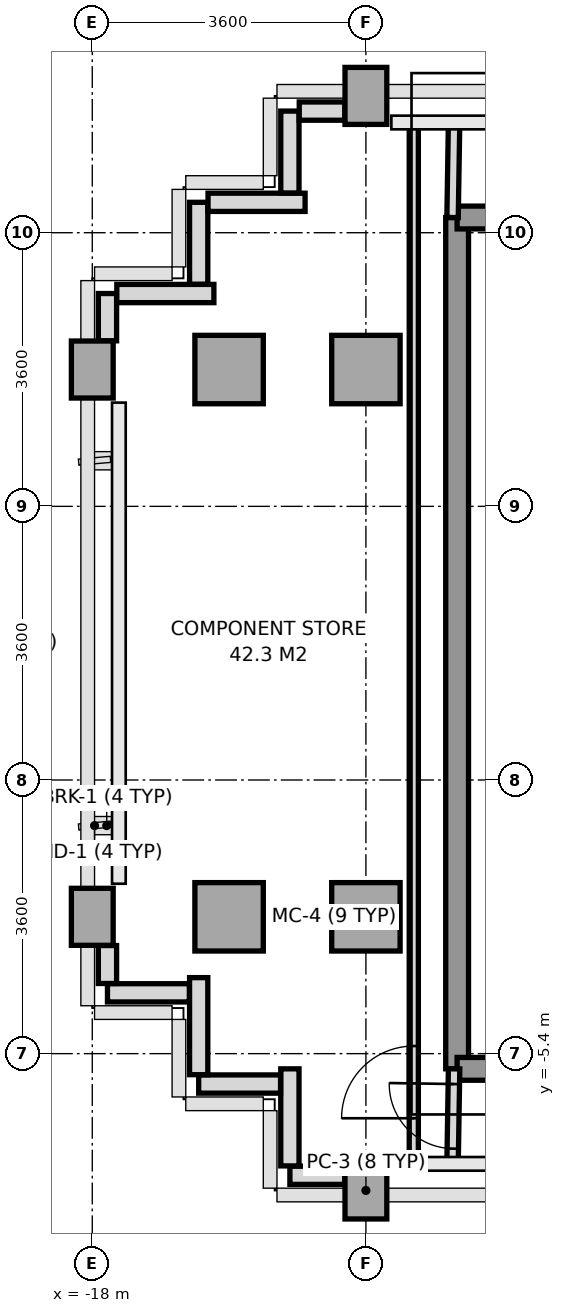
"""IFC4 building model, lengths in metres.
Left out: names, types, materials, properties, quantities, classifications, styles, units other than length and angle.
Written with IfcOpenShell. Run it as: python <this file> out.ifc"""

import sys

from ifc_helpers import new_model, si_unit, direction, frame, frame_2d, origin, origin_2d, place, context, subcontext, project, spatial, rectangle, extrude, source, transform, mapped, element, fill, save


model = new_model("IFC4")
c1 = context("Model", 3, precision=1e-05, world=origin(), true_north=direction((0.0, 1.0)))
c2 = subcontext(c1, "Body", "Model", "MODEL_VIEW")
j1 = project(units=[si_unit("LENGTHUNIT", "METRE"), si_unit("PLANEANGLEUNIT", "RADIAN")], contexts=[c1])
p1 = place(None, origin())
s1 = spatial("IfcSite", under=j1, at=p1, CompositionType="ELEMENT")
p2 = place(p1, origin())
s2 = spatial("IfcBuilding", under=s1, at=p2, CompositionType="ELEMENT")
p3 = place(p2, frame((0.0, 0.0, 239.6)))
s3 = spatial("IfcBuildingStorey", under=s2, at=p3, CompositionType="ELEMENT", Elevation=239.6)
m1 = source(origin(), c2, "Body", "SweptSolid", [
    extrude(rectangle(XDim=0.55, YDim=0.75, at=origin_2d()), origin(), (0.0, 0.0, 1.0), 3.01),
])
for number, where, z_axis, x_axis in (
    (1, (-18.0, -3.6, 0.0), (0.0, 0.0, 1.0), (1.0, 0.0, 0.0)),
    (2, (-18.0, 3.6, 0.0), (0.0, 0.0, 1.0), (1.0, 0.0, 0.0)),
):
    element("IfcColumn", number, at=place(p3, frame(where, z_axis=z_axis, x_axis=x_axis)), inside=s3, PredefinedType="COLUMN", context=c2, shape_type="MappedRepresentation", body=[
        mapped(m1, transform((0.0, 0.0, 0.0), x_axis=(1.0, 0.0, 0.0), y_axis=(0.0, 1.0, 0.0), z_axis=(0.0, 0.0, 1.0), scale=1.0)),
    ])
m2 = source(origin(), c2, "Body", "SweptSolid", [
    extrude(rectangle(XDim=0.9, YDim=0.9, at=origin_2d()), origin(), (0.0, 0.0, 1.0), 3.01),
])
for number, where, z_axis, x_axis in (
    (3, (-16.2, -3.6, 0.0), (0.0, 0.0, 1.0), (1.0, 0.0, 0.0)),
    (4, (-16.2, 3.6, 0.0), (0.0, 0.0, 1.0), (1.0, 0.0, 0.0)),
):
    element("IfcColumn", number, at=place(p3, frame(where, z_axis=z_axis, x_axis=x_axis)), inside=s3, PredefinedType="COLUMN", context=c2, shape_type="MappedRepresentation", body=[
        mapped(m2, transform((0.0, 0.0, 0.0), x_axis=(1.0, 0.0, 0.0), y_axis=(0.0, 1.0, 0.0), z_axis=(0.0, 0.0, 1.0), scale=1.0)),
    ])
p4 = place(p3, frame((-14.4, -7.2, 0.0), z_axis=(0.0, 0.0, 1.0), x_axis=(1.0, 0.0, 0.0)))
e5 = element("IfcColumn", 5, at=p4, inside=s3, PredefinedType="COLUMN", context=c2, shape_type="MappedRepresentation", body=[
    mapped(m1, transform((0.0, 0.0, 0.0), x_axis=(1.0, 0.0, 0.0), y_axis=(0.0, 1.0, 0.0), z_axis=(0.0, 0.0, 1.0), scale=1.0)),
])
for number, where, z_axis, x_axis in (
    (6, (-14.4, -3.6, 0.0), (0.0, 0.0, 1.0), (1.0, 0.0, 0.0)),
    (7, (-14.4, 3.6, 0.0), (0.0, 0.0, 1.0), (1.0, 0.0, 0.0)),
):
    element("IfcColumn", number, at=place(p3, frame(where, z_axis=z_axis, x_axis=x_axis)), inside=s3, PredefinedType="COLUMN", context=c2, shape_type="MappedRepresentation", body=[
        mapped(m2, transform((0.0, 0.0, 0.0), x_axis=(1.0, 0.0, 0.0), y_axis=(0.0, 1.0, 0.0), z_axis=(0.0, 0.0, 1.0), scale=1.0)),
    ])
p5 = place(p3, frame((-14.4, 7.2, 0.0), z_axis=(0.0, 0.0, 1.0), x_axis=(1.0, 0.0, 0.0)))
e8 = element("IfcColumn", 8, at=p5, inside=s3, PredefinedType="COLUMN", context=c2, shape_type="MappedRepresentation", body=[
    mapped(m1, transform((0.0, 0.0, 0.0), x_axis=(1.0, 0.0, 0.0), y_axis=(0.0, 1.0, 0.0), z_axis=(0.0, 0.0, 1.0), scale=1.0)),
])
p6 = place(p3, frame((-14.678, -7.0, 0.0), z_axis=(0.0, 0.0, 1.0), x_axis=(-1.0, 0.0, 0.0)))
e9 = element("IfcWall", 9, at=p6, inside=s3, PredefinedType="PARAPET", context=c2, shape_type="SweptSolid", body=[
    extrude(rectangle(XDim=0.722, YDim=0.24, at=frame_2d((0.361, 0.0))), origin(), (0.0, 0.0, 1.0), 1.15),
])
p7 = place(p3, frame((-15.4, -6.877, 0.0), z_axis=(0.0, 0.0, 1.0), x_axis=(0.0, 1.0, 0.0)))
e10 = element("IfcWall", 10, at=p7, inside=s3, PredefinedType="PARAPET", context=c2, shape_type="SweptSolid", body=[
    extrude(rectangle(XDim=1.277, YDim=0.24, at=frame_2d((0.638, 0.0))), origin(), (0.0, 0.0, 1.0), 1.15),
])
p8 = place(p3, frame((-15.523, -5.8, 0.0), z_axis=(0.0, 0.0, 1.0), x_axis=(-1.0, 0.0, 0.0)))
e11 = element("IfcWall", 11, at=p8, inside=s3, PredefinedType="PARAPET", context=c2, shape_type="SweptSolid", body=[
    extrude(rectangle(XDim=1.077, YDim=0.24, at=frame_2d((0.539, 0.0))), origin(), (0.0, 0.0, 1.0), 1.15),
])
p9 = place(p3, frame((-16.6, -5.677, 0.0), z_axis=(0.0, 0.0, 1.0), x_axis=(0.0, 1.0, 0.0)))
e12 = element("IfcWall", 12, at=p9, inside=s3, PredefinedType="PARAPET", context=c2, shape_type="SweptSolid", body=[
    extrude(rectangle(XDim=1.277, YDim=0.24, at=frame_2d((0.639, 0.0))), origin(), (0.0, 0.0, 1.0), 1.15),
])
p10 = place(p3, frame((-16.723, -4.6, 0.0), z_axis=(0.0, 0.0, 1.0), x_axis=(-1.0, 0.0, 0.0)))
e13 = element("IfcWall", 13, at=p10, inside=s3, PredefinedType="PARAPET", context=c2, shape_type="SweptSolid", body=[
    extrude(rectangle(XDim=1.077, YDim=0.24, at=frame_2d((0.539, 0.0))), origin(), (0.0, 0.0, 1.0), 1.15),
])
p11 = place(p3, frame((-17.8, -4.477, 0.0), z_axis=(0.0, 0.0, 1.0), x_axis=(0.0, 1.0, 0.0)))
e14 = element("IfcWall", 14, at=p11, inside=s3, PredefinedType="PARAPET", context=c2, shape_type="SweptSolid", body=[
    extrude(rectangle(XDim=0.499, YDim=0.24, at=frame_2d((0.25, 0.0))), origin(), (0.0, 0.0, 1.0), 1.15),
])
p12 = place(p3, frame((-17.8, 3.978, 0.0), z_axis=(0.0, 0.0, 1.0), x_axis=(0.0, 1.0, 0.0)))
e15 = element("IfcWall", 15, at=p12, inside=s3, PredefinedType="PARAPET", context=c2, shape_type="SweptSolid", body=[
    extrude(rectangle(XDim=0.622, YDim=0.24, at=frame_2d((0.311, 0.0))), origin(), (0.0, 0.0, 1.0), 1.15),
])
p13 = place(p3, frame((-17.677, 4.6, 0.0), z_axis=(0.0, 0.0, 1.0), x_axis=(1.0, 0.0, 0.0)))
e16 = element("IfcWall", 16, at=p13, inside=s3, PredefinedType="PARAPET", context=c2, shape_type="SweptSolid", body=[
    extrude(rectangle(XDim=1.277, YDim=0.24, at=frame_2d((0.639, 0.0))), origin(), (0.0, 0.0, 1.0), 1.15),
])
p14 = place(p3, frame((-16.6, 4.723, 0.0), z_axis=(0.0, 0.0, 1.0), x_axis=(0.0, 1.0, 0.0)))
e17 = element("IfcWall", 17, at=p14, inside=s3, PredefinedType="PARAPET", context=c2, shape_type="SweptSolid", body=[
    extrude(rectangle(XDim=1.077, YDim=0.24, at=frame_2d((0.539, 0.0))), origin(), (0.0, 0.0, 1.0), 1.15),
])
p15 = place(p3, frame((-16.477, 5.8, 0.0), z_axis=(0.0, 0.0, 1.0), x_axis=(1.0, 0.0, 0.0)))
e18 = element("IfcWall", 18, at=p15, inside=s3, PredefinedType="PARAPET", context=c2, shape_type="SweptSolid", body=[
    extrude(rectangle(XDim=1.277, YDim=0.24, at=frame_2d((0.639, 0.0))), origin(), (0.0, 0.0, 1.0), 1.15),
])
p16 = place(p3, frame((-15.4, 5.923, 0.0), z_axis=(0.0, 0.0, 1.0), x_axis=(0.0, 1.0, 0.0)))
e19 = element("IfcWall", 19, at=p16, inside=s3, PredefinedType="PARAPET", context=c2, shape_type="SweptSolid", body=[
    extrude(rectangle(XDim=1.077, YDim=0.24, at=frame_2d((0.539, 0.0))), origin(), (0.0, 0.0, 1.0), 1.15),
])
p17 = place(p3, frame((-15.277, 7.0, 0.0), z_axis=(0.0, 0.0, 1.0), x_axis=(1.0, 0.0, 0.0)))
e20 = element("IfcWall", 20, at=p17, inside=s3, PredefinedType="PARAPET", context=c2, shape_type="SweptSolid", body=[
    extrude(rectangle(XDim=0.599, YDim=0.24, at=frame_2d((0.3, 0.0))), origin(), (0.0, 0.0, 1.0), 1.15),
])
p18 = place(p3, frame((-13.2, -5.6, 0.0), z_axis=(0.0, 0.0, 1.0), x_axis=(0.0, 1.0, 0.0)))
e21 = element("IfcWall", 21, at=p18, inside=s3, PredefinedType="SHEAR", context=c2, shape_type="SweptSolid", body=[
    extrude(rectangle(XDim=11.2, YDim=0.3, at=frame_2d((5.6, 0.0))), origin(), (0.0, 0.0, 1.0), 3.01),
])
p19 = place(p3, frame((-13.2, 5.6, 0.0), z_axis=(0.0, 0.0, 1.0), x_axis=(1.0, 0.0, 0.0)))
e22 = element("IfcWall", 22, at=p19, inside=s3, PredefinedType="SHEAR", context=c2, shape_type="SweptSolid", body=[
    extrude(rectangle(XDim=1.844, YDim=0.3, at=frame_2d((0.922, 0.0))), origin(), (0.0, 0.0, 1.0), 3.01),
])
p20 = place(p3, frame((-13.2, -5.6, 0.0), z_axis=(0.0, 0.0, 1.0), x_axis=(1.0, 0.0, 0.0)))
e23 = element("IfcWall", 23, at=p20, inside=s3, PredefinedType="SHEAR", context=c2, shape_type="SweptSolid", body=[
    extrude(rectangle(XDim=7.8, YDim=0.3, at=frame_2d((3.9, 0.0))), origin(), (0.0, 0.0, 1.0), 3.01),
])
p21 = place(p3, frame((-13.26, 5.6, 0.0), z_axis=(0.0, 0.0, 1.0), x_axis=(0.016013571389, 0.999871774545, 0.0)))
e24 = element("IfcWall", 24, at=p21, inside=s3, PredefinedType="PARTITIONING", context=c2, shape_type="SweptSolid", body=[
    extrude(rectangle(XDim=1.25, YDim=0.15, at=frame_2d((0.625, 0.0))), origin(), (0.0, 0.0, 1.0), 3.01),
])
p22 = place(p3, frame((-13.26, -6.85, 0.0), z_axis=(0.0, 0.0, 1.0), x_axis=(0.016013571389, 0.999871774545, 0.0)))
e25 = element("IfcWall", 25, at=p22, inside=s3, PredefinedType="PARTITIONING", context=c2, shape_type="SweptSolid", body=[
    extrude(rectangle(XDim=1.25, YDim=0.15, at=frame_2d((0.625, 0.0))), origin(), (0.0, 0.0, 1.0), 3.01),
])
p23 = place(p22, frame((0.2, 0.0, 0.0)))
e26 = element("IfcOpeningElement", 26, at=p23, cuts=e25, PredefinedType="OPENING", context=c2, shape_type="SweptSolid", body=[
    extrude(rectangle(XDim=0.85, YDim=2.1, at=frame_2d((0.425, 1.05))), frame((0.0, 0.085, 0.0), z_axis=(0.0, -1.0, 0.0), x_axis=(1.0, 0.0, 0.0)), (0.0, 0.0, 1.0), 0.17),
])
p24 = place(p3, frame((-13.77, -6.85, 0.0), z_axis=(0.0, 0.0, 1.0), x_axis=(0.0, 1.0, 0.0)))
e27 = element("IfcWall", 27, at=p24, inside=s3, PredefinedType="PARTITIONING", context=c2, shape_type="SweptSolid", body=[
    extrude(rectangle(XDim=13.7, YDim=0.12, at=frame_2d((6.85, 0.0))), origin(), (0.0, 0.0, 1.0), 2.71),
])
p25 = place(p24, frame((0.6, 0.0, 0.0)))
e28 = element("IfcOpeningElement", 28, at=p25, cuts=e27, PredefinedType="OPENING", context=c2, shape_type="SweptSolid", body=[
    extrude(rectangle(XDim=0.95, YDim=2.15, at=frame_2d((0.475, 1.075))), frame((0.0, 0.07, 0.0), z_axis=(0.0, -1.0, 0.0), x_axis=(1.0, 0.0, 0.0)), (0.0, 0.0, 1.0), 0.14),
])
m3 = source(origin(), c2, "Body", "SweptSolid", [
    extrude(rectangle(XDim=0.95, YDim=2.15, at=frame_2d((0.475, 1.075))), frame((0.0, 0.025, 0.0), z_axis=(0.0, -1.0, 0.0), x_axis=(1.0, 0.0, 0.0)), (0.0, 0.0, 1.0), 0.05),
])
p26 = place(p25, origin())
e29 = element("IfcDoor", 29, at=p26, inside=s3, OperationType="SINGLE_SWING_LEFT", PredefinedType="DOOR", context=c2, shape_type="MappedRepresentation", body=[
    mapped(m3, transform((0.0, 0.0, 0.0), x_axis=(1.0, 0.0, 0.0), y_axis=(0.0, 1.0, 0.0), z_axis=(0.0, 0.0, 1.0), scale=1.0)),
])
fill(e28, e29)
m4 = source(origin(), c2, "Body", "SweptSolid", [
    extrude(rectangle(XDim=0.85, YDim=2.1, at=frame_2d((0.425, 1.05))), frame((0.0, 0.025, 0.0), z_axis=(0.0, -1.0, 0.0), x_axis=(1.0, 0.0, 0.0)), (0.0, 0.0, 1.0), 0.05),
])
p27 = place(p23, origin())
e30 = element("IfcDoor", 30, at=p27, inside=s3, OperationType="SINGLE_SWING_RIGHT", PredefinedType="DOOR", context=c2, shape_type="MappedRepresentation", body=[
    mapped(m4, transform((0.0, 0.0, 0.0), x_axis=(1.0, 0.0, 0.0), y_axis=(0.0, 1.0, 0.0), z_axis=(0.0, 0.0, 1.0), scale=1.0)),
])
fill(e26, e30)
save(model, sys.argv[1])
